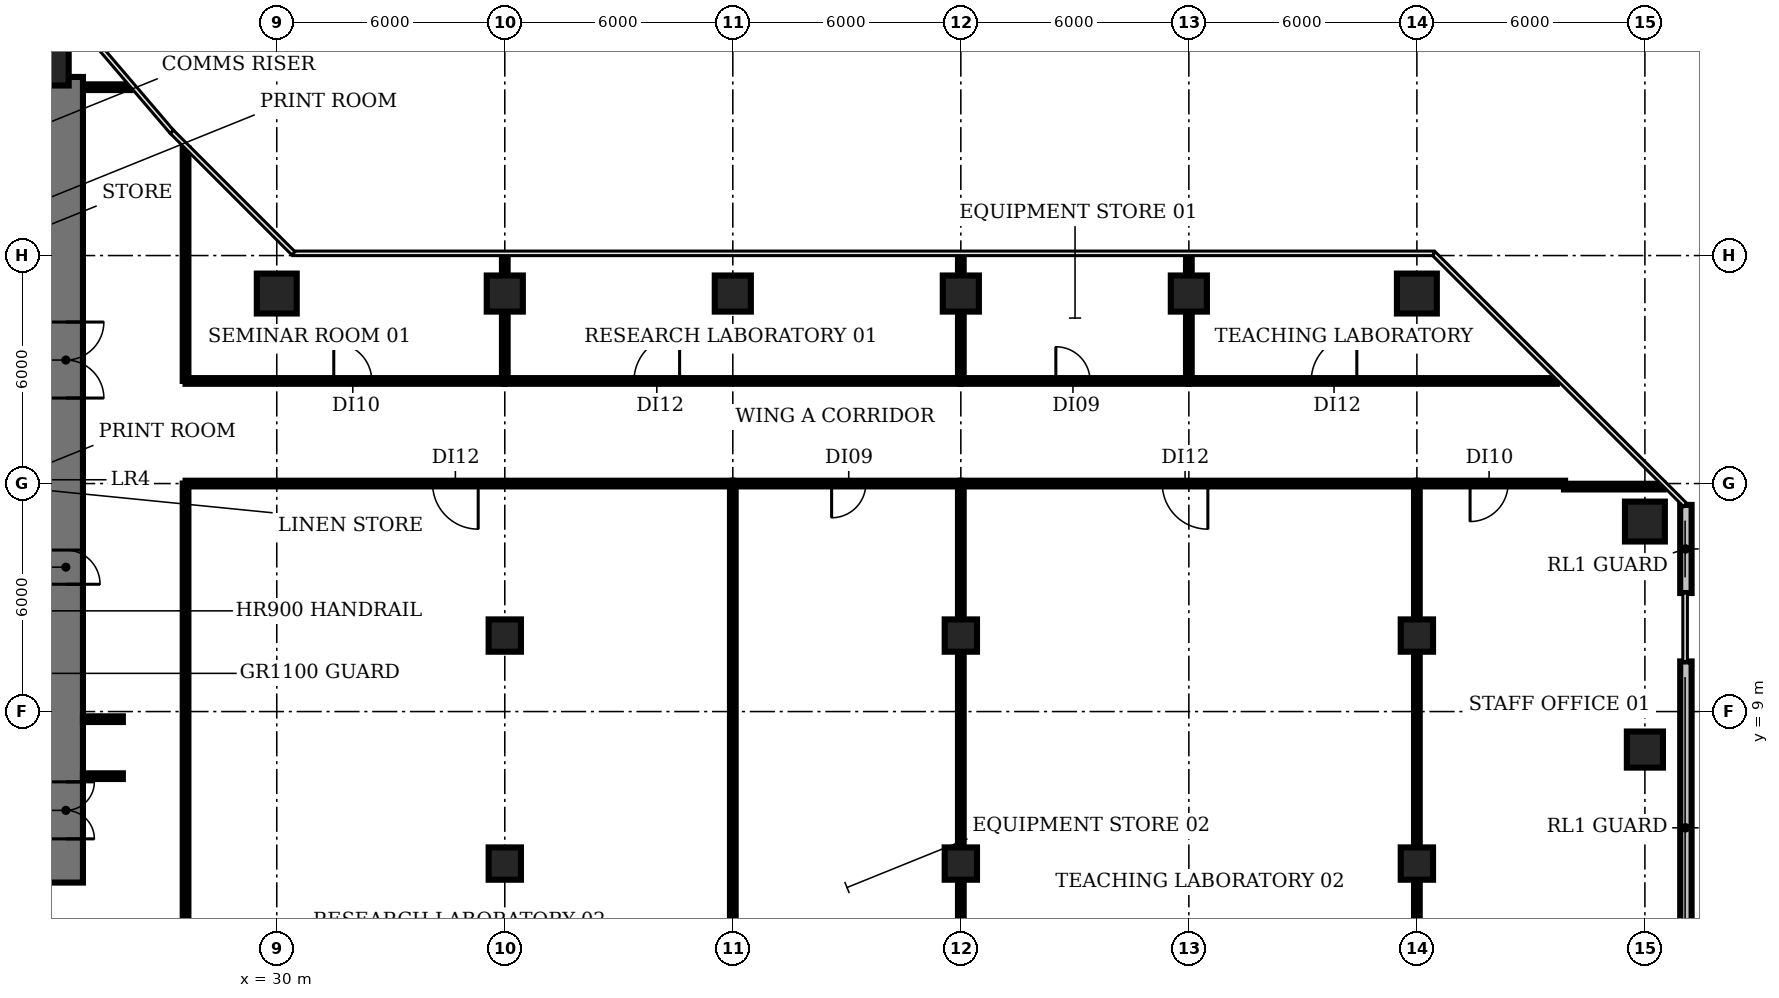
"""IFC4 building model, lengths in metres.
Left out: names, types, materials, properties, quantities, classifications, styles, units other than length and angle.
Written with IfcOpenShell. Run it as: python <this file> out.ifc"""

import sys

from ifc_helpers import new_model, si_unit, direction, frame, frame_2d, origin, origin_2d, place, context, subcontext, project, spatial, rectangle, circle, extrude, element, fill, save


model = new_model("IFC4")
c1 = context("Model", 3, precision=1e-05, world=origin(), true_north=direction((0.0, 1.0)))
c2 = subcontext(c1, "Body", "Model", "MODEL_VIEW")
j1 = project(units=[si_unit("LENGTHUNIT", "METRE"), si_unit("PLANEANGLEUNIT", "RADIAN")], contexts=[c1])
p1 = place(None, origin())
s1 = spatial("IfcSite", under=j1, at=p1, CompositionType="ELEMENT")
p2 = place(p1, origin())
s2 = spatial("IfcBuilding", under=s1, at=p2, CompositionType="ELEMENT")
p3 = place(p2, frame((0.0, 0.0, 33.2)))
s3 = spatial("IfcBuildingStorey", under=s2, at=p3, CompositionType="ELEMENT", Elevation=33.2)
for number, where, z_axis, x_axis in (
    (1, (24.0, 26.0, 0.0), (0.0, 0.0, 1.0), (1.0, 0.0, 0.0)),
    (2, (30.0, 20.0, 0.0), (0.0, 0.0, 1.0), (1.0, 0.0, 0.0)),
):
    element("IfcColumn", number, at=place(p3, frame(where, z_axis=z_axis, x_axis=x_axis)), inside=s3, PredefinedType="COLUMN", context=c2, shape_type="SweptSolid", body=[
        extrude(circle(Radius=0.525, at=origin_2d()), origin(), (0.0, 0.0, 1.0), 3.85),
    ])
for number, where, z_axis, x_axis in (
    (3, (36.0, 5.0, 0.0), (0.0, 0.0, 1.0), (1.0, 0.0, 0.0)),
    (4, (36.0, 11.0, 0.0), (0.0, 0.0, 1.0), (1.0, 0.0, 0.0)),
):
    element("IfcColumn", number, at=place(p3, frame(where, z_axis=z_axis, x_axis=x_axis)), inside=s3, PredefinedType="COLUMN", context=c2, shape_type="SweptSolid", body=[
        extrude(rectangle(XDim=0.85, YDim=0.85, at=origin_2d()), origin(), (0.0, 0.0, 1.0), 3.85),
    ])
for number, where, z_axis, x_axis in (
    (5, (36.0, 20.0, 0.0), (0.0, 0.0, 1.0), (1.0, 0.0, 0.0)),
    (6, (42.0, 20.0, 0.0), (0.0, 0.0, 1.0), (1.0, 0.0, 0.0)),
):
    element("IfcColumn", number, at=place(p3, frame(where, z_axis=z_axis, x_axis=x_axis)), inside=s3, PredefinedType="COLUMN", context=c2, shape_type="SweptSolid", body=[
        extrude(rectangle(XDim=0.95, YDim=0.95, at=origin_2d()), origin(), (0.0, 0.0, 1.0), 3.85),
    ])
for number, where, z_axis, x_axis in (
    (7, (48.0, 5.0, 0.0), (0.0, 0.0, 1.0), (1.0, 0.0, 0.0)),
    (8, (48.0, 11.0, 0.0), (0.0, 0.0, 1.0), (1.0, 0.0, 0.0)),
):
    element("IfcColumn", number, at=place(p3, frame(where, z_axis=z_axis, x_axis=x_axis)), inside=s3, PredefinedType="COLUMN", context=c2, shape_type="SweptSolid", body=[
        extrude(rectangle(XDim=0.85, YDim=0.85, at=origin_2d()), origin(), (0.0, 0.0, 1.0), 3.85),
    ])
for number, where, z_axis, x_axis in (
    (9, (48.0, 20.0, 0.0), (0.0, 0.0, 1.0), (1.0, 0.0, 0.0)),
    (10, (54.0, 20.0, 0.0), (0.0, 0.0, 1.0), (1.0, 0.0, 0.0)),
):
    element("IfcColumn", number, at=place(p3, frame(where, z_axis=z_axis, x_axis=x_axis)), inside=s3, PredefinedType="COLUMN", context=c2, shape_type="SweptSolid", body=[
        extrude(rectangle(XDim=0.95, YDim=0.95, at=origin_2d()), origin(), (0.0, 0.0, 1.0), 3.85),
    ])
for number, where, z_axis, x_axis in (
    (11, (60.0, 5.0, 0.0), (0.0, 0.0, 1.0), (1.0, 0.0, 0.0)),
    (12, (60.0, 11.0, 0.0), (0.0, 0.0, 1.0), (1.0, 0.0, 0.0)),
):
    element("IfcColumn", number, at=place(p3, frame(where, z_axis=z_axis, x_axis=x_axis)), inside=s3, PredefinedType="COLUMN", context=c2, shape_type="SweptSolid", body=[
        extrude(rectangle(XDim=0.85, YDim=0.85, at=origin_2d()), origin(), (0.0, 0.0, 1.0), 3.85),
    ])
p4 = place(p3, frame((60.0, 20.0, 0.0), z_axis=(0.0, 0.0, 1.0), x_axis=(1.0, 0.0, 0.0)))
e13 = element("IfcColumn", 13, at=p4, inside=s3, PredefinedType="COLUMN", context=c2, shape_type="SweptSolid", body=[
    extrude(circle(Radius=0.525, at=origin_2d()), origin(), (0.0, 0.0, 1.0), 3.85),
])
p5 = place(p3, frame((66.0, 8.0, 0.0), z_axis=(0.0, 0.0, 1.0), x_axis=(1.0, 0.0, 0.0)))
e14 = element("IfcColumn", 14, at=p5, inside=s3, PredefinedType="COLUMN", context=c2, shape_type="SweptSolid", body=[
    extrude(rectangle(XDim=0.95, YDim=0.95, at=origin_2d()), origin(), (0.0, 0.0, 1.0), 3.85),
])
p6 = place(p3, frame((66.0, 14.0, 0.0), z_axis=(0.0, 0.0, 1.0), x_axis=(1.0, 0.0, 0.0)))
e15 = element("IfcColumn", 15, at=p6, inside=s3, PredefinedType="COLUMN", context=c2, shape_type="SweptSolid", body=[
    extrude(circle(Radius=0.525, at=origin_2d()), origin(), (0.0, 0.0, 1.0), 3.85),
])
p7 = place(p3, frame((67.079, 1.562, 0.0), z_axis=(0.0, 0.0, 1.0), x_axis=(0.0, 1.0, 0.0)))
e16 = element("IfcWall", 16, at=p7, inside=s3, PredefinedType="SOLIDWALL", context=c2, shape_type="SweptSolid", body=[
    extrude(rectangle(XDim=8.757, YDim=0.3, at=frame_2d((4.379, 0.0))), origin(), (0.0, 0.0, 1.0), 3.85),
])
p8 = place(p3, frame((67.079, 12.119, 0.0), z_axis=(0.0, 0.0, 1.0), x_axis=(0.0, 1.0, 0.0)))
e17 = element("IfcWall", 17, at=p8, inside=s3, PredefinedType="SOLIDWALL", context=c2, shape_type="SweptSolid", body=[
    extrude(rectangle(XDim=2.319, YDim=0.3, at=frame_2d((1.16, 0.0))), origin(), (0.0, 0.0, 1.0), 3.85),
])
p9 = place(p3, frame((24.45, 25.7, 0.0), z_axis=(0.0, 0.0, 1.0), x_axis=(0.0, -1.0, 0.0)))
e18 = element("IfcWall", 18, at=p9, inside=s3, PredefinedType="SHEAR", context=c2, shape_type="SweptSolid", body=[
    extrude(rectangle(XDim=21.2, YDim=0.9, at=frame_2d((10.6, 0.0))), origin(), (0.0, 0.0, 1.0), 3.85),
])
p10 = place(p9, frame((18.55, 0.0, 0.0)))
e19 = element("IfcOpeningElement", 19, at=p10, cuts=e18, PredefinedType="OPENING", context=c2, shape_type="SweptSolid", body=[
    extrude(rectangle(XDim=1.5, YDim=2.1, at=frame_2d((0.75, 1.05))), frame((0.0, 0.46, 0.0), z_axis=(0.0, -1.0, 0.0), x_axis=(1.0, 0.0, 0.0)), (0.0, 0.0, 1.0), 0.92),
])
p11 = place(p9, frame((12.45, 0.0, 0.0)))
e20 = element("IfcOpeningElement", 20, at=p11, cuts=e18, PredefinedType="OPENING", context=c2, shape_type="SweptSolid", body=[
    extrude(rectangle(XDim=0.9, YDim=2.1, at=frame_2d((0.45, 1.05))), frame((0.0, 0.46, 0.0), z_axis=(0.0, -1.0, 0.0), x_axis=(1.0, 0.0, 0.0)), (0.0, 0.0, 1.0), 0.92),
])
p12 = place(p9, frame((6.45, 0.0, 0.0)))
e21 = element("IfcOpeningElement", 21, at=p12, cuts=e18, PredefinedType="OPENING", context=c2, shape_type="SweptSolid", body=[
    extrude(rectangle(XDim=2.0, YDim=2.1, at=frame_2d((1.0, 1.05))), frame((0.0, 0.46, 0.0), z_axis=(0.0, -1.0, 0.0), x_axis=(1.0, 0.0, 0.0)), (0.0, 0.0, 1.0), 0.92),
])
for number, where, z_axis, x_axis in (
    (22, (24.9, 7.3, 0.0), (0.0, 0.0, 1.0), (1.0, 0.0, 0.0)),
    (23, (24.9, 8.8, 0.0), (0.0, 0.0, 1.0), (1.0, 0.0, 0.0)),
):
    element("IfcWall", number, at=place(p3, frame(where, z_axis=z_axis, x_axis=x_axis)), inside=s3, PredefinedType="PARTITIONING", context=c2, shape_type="SweptSolid", body=[
        extrude(rectangle(XDim=1.05, YDim=0.15, at=frame_2d((0.525, 0.0))), origin(), (0.0, 0.0, 1.0), 2.83),
    ])
p13 = place(p3, frame((25.0, 25.43, 0.0), z_axis=(0.0, 0.0, 1.0), x_axis=(1.0, 0.0, 0.0)))
e24 = element("IfcWall", 24, at=p13, inside=s3, PredefinedType="PARTITIONING", context=c2, shape_type="SweptSolid", body=[
    extrude(rectangle(XDim=1.158, YDim=0.15, at=frame_2d((0.579, 0.0))), origin(), (0.0, 0.0, 1.0), 2.83),
])
p14 = place(p3, frame((27.6, 0.6, 0.0), z_axis=(0.0, 0.0, 1.0), x_axis=(0.0, 1.0, 0.0)))
e25 = element("IfcWall", 25, at=p14, inside=s3, PredefinedType="PARTITIONING", context=c2, shape_type="SweptSolid", body=[
    extrude(rectangle(XDim=14.4, YDim=0.15, at=frame_2d((7.2, 0.0))), origin(), (0.0, 0.0, 1.0), 2.83),
])
p15 = place(p3, frame((27.6, 17.7, 0.0), z_axis=(0.0, 0.0, 1.0), x_axis=(0.0, 1.0, 0.0)))
e26 = element("IfcWall", 26, at=p15, inside=s3, PredefinedType="PARTITIONING", context=c2, shape_type="SweptSolid", body=[
    extrude(rectangle(XDim=6.12, YDim=0.15, at=frame_2d((3.06, 0.0))), origin(), (0.0, 0.0, 1.0), 2.83),
])
p16 = place(p3, frame((27.6, 17.7, 0.0), z_axis=(0.0, 0.0, 1.0), x_axis=(1.0, 0.0, 0.0)))
e27 = element("IfcWall", 27, at=p16, inside=s3, PredefinedType="PARTITIONING", context=c2, shape_type="SweptSolid", body=[
    extrude(rectangle(XDim=8.4, YDim=0.15, at=frame_2d((4.2, 0.0))), origin(), (0.0, 0.0, 1.0), 2.83),
])
p17 = place(p16, frame((3.9, 0.0, 0.0)))
e28 = element("IfcOpeningElement", 28, at=p17, cuts=e27, PredefinedType="OPENING", context=c2, shape_type="SweptSolid", body=[
    extrude(rectangle(XDim=1.0, YDim=2.1, at=frame_2d((0.5, 1.05))), frame((0.0, 0.085, 0.0), z_axis=(0.0, -1.0, 0.0), x_axis=(1.0, 0.0, 0.0)), (0.0, 0.0, 1.0), 0.17),
])
p18 = place(p3, frame((36.0, 17.7, 0.0), z_axis=(0.0, 0.0, 1.0), x_axis=(0.0, 1.0, 0.0)))
e29 = element("IfcWall", 29, at=p18, inside=s3, PredefinedType="PARTITIONING", context=c2, shape_type="SweptSolid", body=[
    extrude(rectangle(XDim=3.31, YDim=0.15, at=frame_2d((1.655, 0.0))), origin(), (0.0, 0.0, 1.0), 2.83),
])
p19 = place(p3, frame((36.0, 17.7, 0.0), z_axis=(0.0, 0.0, 1.0), x_axis=(1.0, 0.0, 0.0)))
e30 = element("IfcWall", 30, at=p19, inside=s3, PredefinedType="PARTITIONING", context=c2, shape_type="SweptSolid", body=[
    extrude(rectangle(XDim=12.0, YDim=0.15, at=frame_2d((6.0, 0.0))), origin(), (0.0, 0.0, 1.0), 2.83),
])
p20 = place(p19, frame((3.4, 0.0, 0.0)))
e31 = element("IfcOpeningElement", 31, at=p20, cuts=e30, PredefinedType="OPENING", context=c2, shape_type="SweptSolid", body=[
    extrude(rectangle(XDim=1.2, YDim=2.1, at=frame_2d((0.6, 1.05))), frame((0.0, 0.085, 0.0), z_axis=(0.0, -1.0, 0.0), x_axis=(1.0, 0.0, 0.0)), (0.0, 0.0, 1.0), 0.17),
])
p21 = place(p3, frame((42.0, -6.26, 0.0), z_axis=(0.0, 0.0, 1.0), x_axis=(0.0, 1.0, 0.0)))
e32 = element("IfcWall", 32, at=p21, inside=s3, PredefinedType="PARTITIONING", context=c2, shape_type="SweptSolid", body=[
    extrude(rectangle(XDim=21.26, YDim=0.15, at=frame_2d((10.63, 0.0))), origin(), (0.0, 0.0, 1.0), 2.83),
])
p22 = place(p3, frame((42.0, 15.0, 0.0), z_axis=(0.0, 0.0, 1.0), x_axis=(-1.0, 0.0, 0.0)))
e33 = element("IfcWall", 33, at=p22, inside=s3, PredefinedType="PARTITIONING", context=c2, shape_type="SweptSolid", body=[
    extrude(rectangle(XDim=14.4, YDim=0.15, at=frame_2d((7.2, 0.0))), origin(), (0.0, 0.0, 1.0), 2.83),
])
p23 = place(p22, frame((6.7, 0.0, 0.0)))
e34 = element("IfcOpeningElement", 34, at=p23, cuts=e33, PredefinedType="OPENING", context=c2, shape_type="SweptSolid", body=[
    extrude(rectangle(XDim=1.2, YDim=2.1, at=frame_2d((0.6, 1.05))), frame((0.0, 0.085, 0.0), z_axis=(0.0, -1.0, 0.0), x_axis=(1.0, 0.0, 0.0)), (0.0, 0.0, 1.0), 0.17),
])
p24 = place(p3, frame((48.0, -6.73, 0.0), z_axis=(0.0, 0.0, 1.0), x_axis=(0.0, 1.0, 0.0)))
e35 = element("IfcWall", 35, at=p24, inside=s3, PredefinedType="PARTITIONING", context=c2, shape_type="SweptSolid", body=[
    extrude(rectangle(XDim=21.73, YDim=0.15, at=frame_2d((10.865, 0.0))), origin(), (0.0, 0.0, 1.0), 2.83),
])
p25 = place(p3, frame((48.0, 15.0, 0.0), z_axis=(0.0, 0.0, 1.0), x_axis=(-1.0, 0.0, 0.0)))
e36 = element("IfcWall", 36, at=p25, inside=s3, PredefinedType="PARTITIONING", context=c2, shape_type="SweptSolid", body=[
    extrude(rectangle(XDim=6.0, YDim=0.15, at=frame_2d((3.0, 0.0))), origin(), (0.0, 0.0, 1.0), 2.83),
])
p26 = place(p25, frame((2.5, 0.0, 0.0)))
e37 = element("IfcOpeningElement", 37, at=p26, cuts=e36, PredefinedType="OPENING", context=c2, shape_type="SweptSolid", body=[
    extrude(rectangle(XDim=0.9, YDim=2.1, at=frame_2d((0.45, 1.05))), frame((0.0, 0.085, 0.0), z_axis=(0.0, -1.0, 0.0), x_axis=(1.0, 0.0, 0.0)), (0.0, 0.0, 1.0), 0.17),
])
p27 = place(p3, frame((48.0, 17.7, 0.0), z_axis=(0.0, 0.0, 1.0), x_axis=(0.0, 1.0, 0.0)))
e38 = element("IfcWall", 38, at=p27, inside=s3, PredefinedType="PARTITIONING", context=c2, shape_type="SweptSolid", body=[
    extrude(rectangle(XDim=3.31, YDim=0.15, at=frame_2d((1.655, 0.0))), origin(), (0.0, 0.0, 1.0), 2.83),
])
p28 = place(p3, frame((48.0, 17.7, 0.0), z_axis=(0.0, 0.0, 1.0), x_axis=(1.0, 0.0, 0.0)))
e39 = element("IfcWall", 39, at=p28, inside=s3, PredefinedType="PARTITIONING", context=c2, shape_type="SweptSolid", body=[
    extrude(rectangle(XDim=6.0, YDim=0.15, at=frame_2d((3.0, 0.0))), origin(), (0.0, 0.0, 1.0), 2.83),
])
p29 = place(p28, frame((2.5, 0.0, 0.0)))
e40 = element("IfcOpeningElement", 40, at=p29, cuts=e39, PredefinedType="OPENING", context=c2, shape_type="SweptSolid", body=[
    extrude(rectangle(XDim=0.9, YDim=2.1, at=frame_2d((0.45, 1.05))), frame((0.0, 0.085, 0.0), z_axis=(0.0, -1.0, 0.0), x_axis=(1.0, 0.0, 0.0)), (0.0, 0.0, 1.0), 0.17),
])
p30 = place(p3, frame((54.0, 17.7, 0.0), z_axis=(0.0, 0.0, 1.0), x_axis=(0.0, 1.0, 0.0)))
e41 = element("IfcWall", 41, at=p30, inside=s3, PredefinedType="PARTITIONING", context=c2, shape_type="SweptSolid", body=[
    extrude(rectangle(XDim=3.31, YDim=0.15, at=frame_2d((1.655, 0.0))), origin(), (0.0, 0.0, 1.0), 2.83),
])
p31 = place(p3, frame((54.0, 17.7, 0.0), z_axis=(0.0, 0.0, 1.0), x_axis=(1.0, 0.0, 0.0)))
e42 = element("IfcWall", 42, at=p31, inside=s3, PredefinedType="PARTITIONING", context=c2, shape_type="SweptSolid", body=[
    extrude(rectangle(XDim=9.683, YDim=0.15, at=frame_2d((4.842, 0.0))), origin(), (0.0, 0.0, 1.0), 2.83),
])
p32 = place(p31, frame((3.22, 0.0, 0.0)))
e43 = element("IfcOpeningElement", 43, at=p32, cuts=e42, PredefinedType="OPENING", context=c2, shape_type="SweptSolid", body=[
    extrude(rectangle(XDim=1.2, YDim=2.1, at=frame_2d((0.6, 1.05))), frame((0.0, 0.085, 0.0), z_axis=(0.0, -1.0, 0.0), x_axis=(1.0, 0.0, 0.0)), (0.0, 0.0, 1.0), 0.17),
])
p33 = place(p3, frame((60.0, -5.5, 0.0), z_axis=(0.0, 0.0, 1.0), x_axis=(0.0, 1.0, 0.0)))
e44 = element("IfcWall", 44, at=p33, inside=s3, PredefinedType="PARTITIONING", context=c2, shape_type="SweptSolid", body=[
    extrude(rectangle(XDim=20.5, YDim=0.15, at=frame_2d((10.25, 0.0))), origin(), (0.0, 0.0, 1.0), 2.83),
])
p34 = place(p3, frame((60.0, 15.0, 0.0), z_axis=(0.0, 0.0, 1.0), x_axis=(-1.0, 0.0, 0.0)))
e45 = element("IfcWall", 45, at=p34, inside=s3, PredefinedType="PARTITIONING", context=c2, shape_type="SweptSolid", body=[
    extrude(rectangle(XDim=12.0, YDim=0.15, at=frame_2d((6.0, 0.0))), origin(), (0.0, 0.0, 1.0), 2.83),
])
p35 = place(p34, frame((5.5, 0.0, 0.0)))
e46 = element("IfcOpeningElement", 46, at=p35, cuts=e45, PredefinedType="OPENING", context=c2, shape_type="SweptSolid", body=[
    extrude(rectangle(XDim=1.2, YDim=2.1, at=frame_2d((0.6, 1.05))), frame((0.0, 0.085, 0.0), z_axis=(0.0, -1.0, 0.0), x_axis=(1.0, 0.0, 0.0)), (0.0, 0.0, 1.0), 0.17),
])
p36 = place(p3, frame((63.87, 14.92, 0.0), z_axis=(0.0, 0.0, 1.0), x_axis=(1.0, 0.0, 0.0)))
e47 = element("IfcWall", 47, at=p36, inside=s3, PredefinedType="PARTITIONING", context=c2, shape_type="SweptSolid", body=[
    extrude(rectangle(XDim=2.621, YDim=0.15, at=frame_2d((1.311, 0.0))), origin(), (0.0, 0.0, 1.0), 2.83),
])
p37 = place(p3, frame((63.9, 15.0, 0.0), z_axis=(0.0, 0.0, 1.0), x_axis=(-1.0, 0.0, 0.0)))
e48 = element("IfcWall", 48, at=p37, inside=s3, PredefinedType="PARTITIONING", context=c2, shape_type="SweptSolid", body=[
    extrude(rectangle(XDim=3.9, YDim=0.15, at=frame_2d((1.95, 0.0))), origin(), (0.0, 0.0, 1.0), 2.83),
])
p38 = place(p37, frame((1.5, 0.0, 0.0)))
e49 = element("IfcOpeningElement", 49, at=p38, cuts=e48, PredefinedType="OPENING", context=c2, shape_type="SweptSolid", body=[
    extrude(rectangle(XDim=1.0, YDim=2.1, at=frame_2d((0.5, 1.05))), frame((0.0, 0.085, 0.0), z_axis=(0.0, -1.0, 0.0), x_axis=(1.0, 0.0, 0.0)), (0.0, 0.0, 1.0), 0.17),
])
p39 = place(p10, origin())
e50 = element("IfcDoor", 50, at=p39, inside=s3, OperationType="DOUBLE_DOOR_SINGLE_SWING", PredefinedType="DOOR", context=c2, shape_type="SweptSolid", body=[
    extrude(rectangle(XDim=1.5, YDim=2.1, at=frame_2d((0.75, 1.05))), frame((0.0, 0.025, 0.0), z_axis=(0.0, -1.0, 0.0), x_axis=(1.0, 0.0, 0.0)), (0.0, 0.0, 1.0), 0.05),
])
fill(e19, e50)
p40 = place(p12, origin())
e51 = element("IfcDoor", 51, at=p40, inside=s3, OperationType="DOUBLE_DOOR_SINGLE_SWING", PredefinedType="DOOR", context=c2, shape_type="SweptSolid", body=[
    extrude(rectangle(XDim=2.0, YDim=2.1, at=frame_2d((1.0, 1.05))), frame((0.0, 0.025, 0.0), z_axis=(0.0, -1.0, 0.0), x_axis=(1.0, 0.0, 0.0)), (0.0, 0.0, 1.0), 0.05),
])
fill(e21, e51)
p41 = place(p17, origin())
e52 = element("IfcDoor", 52, at=p41, inside=s3, OperationType="SINGLE_SWING_LEFT", PredefinedType="DOOR", context=c2, shape_type="SweptSolid", body=[
    extrude(rectangle(XDim=1.0, YDim=2.1, at=frame_2d((0.5, 1.05))), frame((0.0, 0.025, 0.0), z_axis=(0.0, -1.0, 0.0), x_axis=(1.0, 0.0, 0.0)), (0.0, 0.0, 1.0), 0.05),
])
fill(e28, e52)
p42 = place(p20, origin())
e53 = element("IfcDoor", 53, at=p42, inside=s3, OperationType="SINGLE_SWING_RIGHT", PredefinedType="DOOR", context=c2, shape_type="SweptSolid", body=[
    extrude(rectangle(XDim=1.2, YDim=2.1, at=frame_2d((0.6, 1.05))), frame((0.0, 0.025, 0.0), z_axis=(0.0, -1.0, 0.0), x_axis=(1.0, 0.0, 0.0)), (0.0, 0.0, 1.0), 0.05),
])
fill(e31, e53)
p43 = place(p23, origin())
e54 = element("IfcDoor", 54, at=p43, inside=s3, OperationType="SINGLE_SWING_LEFT", PredefinedType="DOOR", context=c2, shape_type="SweptSolid", body=[
    extrude(rectangle(XDim=1.2, YDim=2.1, at=frame_2d((0.6, 1.05))), frame((0.0, 0.025, 0.0), z_axis=(0.0, -1.0, 0.0), x_axis=(1.0, 0.0, 0.0)), (0.0, 0.0, 1.0), 0.05),
])
fill(e34, e54)
p44 = place(p26, origin())
e55 = element("IfcDoor", 55, at=p44, inside=s3, OperationType="SINGLE_SWING_RIGHT", PredefinedType="DOOR", context=c2, shape_type="SweptSolid", body=[
    extrude(rectangle(XDim=0.9, YDim=2.1, at=frame_2d((0.45, 1.05))), frame((0.0, 0.025, 0.0), z_axis=(0.0, -1.0, 0.0), x_axis=(1.0, 0.0, 0.0)), (0.0, 0.0, 1.0), 0.05),
])
fill(e37, e55)
p45 = place(p29, origin())
e56 = element("IfcDoor", 56, at=p45, inside=s3, OperationType="SINGLE_SWING_LEFT", PredefinedType="DOOR", context=c2, shape_type="SweptSolid", body=[
    extrude(rectangle(XDim=0.9, YDim=2.1, at=frame_2d((0.45, 1.05))), frame((0.0, 0.025, 0.0), z_axis=(0.0, -1.0, 0.0), x_axis=(1.0, 0.0, 0.0)), (0.0, 0.0, 1.0), 0.05),
])
fill(e40, e56)
p46 = place(p32, origin())
e57 = element("IfcDoor", 57, at=p46, inside=s3, OperationType="SINGLE_SWING_RIGHT", PredefinedType="DOOR", context=c2, shape_type="SweptSolid", body=[
    extrude(rectangle(XDim=1.2, YDim=2.1, at=frame_2d((0.6, 1.05))), frame((0.0, 0.025, 0.0), z_axis=(0.0, -1.0, 0.0), x_axis=(1.0, 0.0, 0.0)), (0.0, 0.0, 1.0), 0.05),
])
fill(e43, e57)
p47 = place(p35, origin())
e58 = element("IfcDoor", 58, at=p47, inside=s3, OperationType="SINGLE_SWING_LEFT", PredefinedType="DOOR", context=c2, shape_type="SweptSolid", body=[
    extrude(rectangle(XDim=1.2, YDim=2.1, at=frame_2d((0.6, 1.05))), frame((0.0, 0.025, 0.0), z_axis=(0.0, -1.0, 0.0), x_axis=(1.0, 0.0, 0.0)), (0.0, 0.0, 1.0), 0.05),
])
fill(e46, e58)
p48 = place(p38, origin())
e59 = element("IfcDoor", 59, at=p48, inside=s3, OperationType="SINGLE_SWING_RIGHT", PredefinedType="DOOR", context=c2, shape_type="SweptSolid", body=[
    extrude(rectangle(XDim=1.0, YDim=2.1, at=frame_2d((0.5, 1.05))), frame((0.0, 0.025, 0.0), z_axis=(0.0, -1.0, 0.0), x_axis=(1.0, 0.0, 0.0)), (0.0, 0.0, 1.0), 0.05),
])
fill(e49, e59)
save(model, sys.argv[1])
